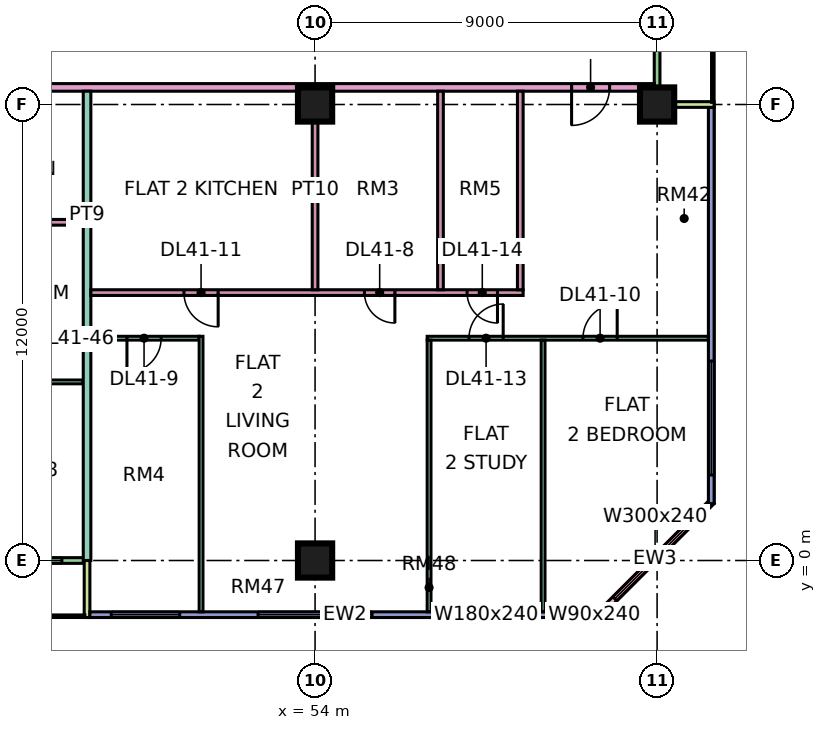
"""IFC4 building model, lengths in metres.
Left out: names, types, materials, properties, quantities, classifications, styles, units other than length and angle.
Written with IfcOpenShell. Run it as: python <this file> out.ifc"""

import sys

from ifc_helpers import new_model, si_unit, direction, frame, frame_2d, origin, origin_2d, place, context, subcontext, project, spatial, rectangle, extrude, element, fill, save


model = new_model("IFC4")
c1 = context("Model", 3, precision=1e-05, world=origin(), true_north=direction((0.0, 1.0)))
c2 = subcontext(c1, "Body", "Model", "MODEL_VIEW")
j1 = project(units=[si_unit("LENGTHUNIT", "METRE"), si_unit("PLANEANGLEUNIT", "RADIAN")], contexts=[c1])
p1 = place(None, origin())
s1 = spatial("IfcSite", under=j1, at=p1, CompositionType="ELEMENT")
p2 = place(p1, origin())
s2 = spatial("IfcBuilding", under=s1, at=p2, CompositionType="ELEMENT")
p3 = place(p2, frame((0.0, 0.0, 179.9)))
s3 = spatial("IfcBuildingStorey", under=s2, at=p3, CompositionType="ELEMENT", Elevation=179.9)
for number, where, z_axis, x_axis in (
    (1, (54.0, 0.0, 0.0), (0.0, 0.0, 1.0), (1.0, 0.0, 0.0)),
    (2, (54.0, 12.0, 0.0), (0.0, 0.0, 1.0), (1.0, 0.0, 0.0)),
    (3, (63.0, 12.0, 0.0), (0.0, 0.0, 1.0), (1.0, 0.0, 0.0)),
):
    element("IfcColumn", number, at=place(p3, frame(where, z_axis=z_axis, x_axis=x_axis)), inside=s3, PredefinedType="COLUMN", context=c2, shape_type="SweptSolid", body=[
        extrude(rectangle(XDim=0.9, YDim=0.9, at=origin_2d()), origin(), (0.0, 0.0, 1.0), 3.75),
    ])
p4 = place(p3, frame((36.075, 0.0, 0.0), z_axis=(0.0, 0.0, 1.0), x_axis=(1.0, 0.0, 0.0)))
e4 = element("IfcWall", 4, at=p4, inside=s3, PredefinedType="SOLIDWALL", context=c2, shape_type="SweptSolid", body=[
    extrude(rectangle(XDim=11.85, YDim=0.15, at=frame_2d((5.925, 0.0))), origin(), (0.0, 0.0, 1.0), 3.35),
])
p5 = place(p4, frame((2.3, 0.0, 0.0)))
e5 = element("IfcOpeningElement", 5, at=p5, cuts=e4, PredefinedType="OPENING", context=c2, shape_type="SweptSolid", body=[
    extrude(rectangle(XDim=1.8, YDim=2.4, at=frame_2d((0.9, 1.2))), frame((0.0, 0.085, 0.0), z_axis=(0.0, -1.0, 0.0), x_axis=(1.0, 0.0, 0.0)), (0.0, 0.0, 1.0), 0.17),
])
p6 = place(p4, frame((6.55, 0.0, 0.45)))
e6 = element("IfcOpeningElement", 6, at=p6, cuts=e4, PredefinedType="OPENING", context=c2, shape_type="SweptSolid", body=[
    extrude(rectangle(XDim=1.2, YDim=2.4, at=frame_2d((0.6, 1.2))), frame((0.0, 0.085, 0.0), z_axis=(0.0, -1.0, 0.0), x_axis=(1.0, 0.0, 0.0)), (0.0, 0.0, 1.0), 0.17),
])
p7 = place(p4, frame((10.062, 0.0, 0.45)))
e7 = element("IfcOpeningElement", 7, at=p7, cuts=e4, PredefinedType="OPENING", context=c2, shape_type="SweptSolid", body=[
    extrude(rectangle(XDim=1.2, YDim=2.4, at=frame_2d((0.6, 1.2))), frame((0.0, 0.085, 0.0), z_axis=(0.0, -1.0, 0.0), x_axis=(1.0, 0.0, 0.0)), (0.0, 0.0, 1.0), 0.17),
])
p8 = place(p3, frame((48.0, -1.5, 0.0), z_axis=(0.0, 0.0, 1.0), x_axis=(0.0, 1.0, 0.0)))
e8 = element("IfcWall", 8, at=p8, inside=s3, PredefinedType="SOLIDWALL", context=c2, shape_type="SweptSolid", body=[
    extrude(rectangle(XDim=1.5, YDim=0.15, at=frame_2d((0.75, 0.0))), origin(), (0.0, 0.0, 1.0), 3.35),
])
p9 = place(p3, frame((48.075, -1.425, 0.0), z_axis=(0.0, 0.0, 1.0), x_axis=(1.0, 0.0, 0.0)))
e9 = element("IfcWall", 9, at=p9, inside=s3, PredefinedType="SOLIDWALL", context=c2, shape_type="SweptSolid", body=[
    extrude(rectangle(XDim=13.425, YDim=0.15, at=frame_2d((6.712, 0.0))), origin(), (0.0, 0.0, 1.0), 3.35),
])
p10 = place(p9, frame((0.562, 0.0, 0.45)))
e10 = element("IfcOpeningElement", 10, at=p10, cuts=e9, PredefinedType="OPENING", context=c2, shape_type="SweptSolid", body=[
    extrude(rectangle(XDim=1.8, YDim=2.4, at=frame_2d((0.9, 1.2))), frame((0.0, 0.085, 0.0), z_axis=(0.0, -1.0, 0.0), x_axis=(1.0, 0.0, 0.0)), (0.0, 0.0, 1.0), 0.17),
])
p11 = place(p9, frame((4.425, 0.0, 0.45)))
e11 = element("IfcOpeningElement", 11, at=p11, cuts=e9, PredefinedType="OPENING", context=c2, shape_type="SweptSolid", body=[
    extrude(rectangle(XDim=3.0, YDim=2.4, at=frame_2d((1.5, 1.2))), frame((0.0, 0.085, 0.0), z_axis=(0.0, -1.0, 0.0), x_axis=(1.0, 0.0, 0.0)), (0.0, 0.0, 1.0), 0.17),
])
p12 = place(p9, frame((9.525, 0.0, 0.45)))
e12 = element("IfcOpeningElement", 12, at=p12, cuts=e9, PredefinedType="OPENING", context=c2, shape_type="SweptSolid", body=[
    extrude(rectangle(XDim=1.8, YDim=2.4, at=frame_2d((0.9, 1.2))), frame((0.0, 0.085, 0.0), z_axis=(0.0, -1.0, 0.0), x_axis=(1.0, 0.0, 0.0)), (0.0, 0.0, 1.0), 0.17),
])
p13 = place(p9, frame((12.225, 0.0, 0.45)))
e13 = element("IfcOpeningElement", 13, at=p13, cuts=e9, PredefinedType="OPENING", context=c2, shape_type="SweptSolid", body=[
    extrude(rectangle(XDim=0.9, YDim=2.4, at=frame_2d((0.45, 1.2))), frame((0.0, 0.085, 0.0), z_axis=(0.0, -1.0, 0.0), x_axis=(1.0, 0.0, 0.0)), (0.0, 0.0, 1.0), 0.17),
])
p14 = place(p3, frame((61.447, -1.447, 0.0), z_axis=(0.0, 0.0, 1.0), x_axis=(0.707106781187, 0.707106781187, 0.0)))
e14 = element("IfcWall", 14, at=p14, inside=s3, PredefinedType="SOLIDWALL", context=c2, shape_type="SweptSolid", body=[
    extrude(rectangle(XDim=4.243, YDim=0.15, at=frame_2d((2.121, 0.0))), origin(), (0.0, 0.0, 1.0), 3.35),
])
p15 = place(p14, frame((0.621, 0.0, 0.45)))
e15 = element("IfcOpeningElement", 15, at=p15, cuts=e14, PredefinedType="OPENING", context=c2, shape_type="SweptSolid", body=[
    extrude(rectangle(XDim=3.0, YDim=2.4, at=frame_2d((1.5, 1.2))), frame((0.0, 0.085, 0.0), z_axis=(0.0, -1.0, 0.0), x_axis=(1.0, 0.0, 0.0)), (0.0, 0.0, 1.0), 0.17),
])
p16 = place(p3, frame((64.425, 1.5, 0.0), z_axis=(0.0, 0.0, 1.0), x_axis=(0.0, 1.0, 0.0)))
e16 = element("IfcWall", 16, at=p16, inside=s3, PredefinedType="SOLIDWALL", context=c2, shape_type="SweptSolid", body=[
    extrude(rectangle(XDim=10.425, YDim=0.15, at=frame_2d((5.212, 0.0))), origin(), (0.0, 0.0, 1.0), 3.35),
])
p17 = place(p16, frame((0.75, 0.0, 0.45)))
e17 = element("IfcOpeningElement", 17, at=p17, cuts=e16, PredefinedType="OPENING", context=c2, shape_type="SweptSolid", body=[
    extrude(rectangle(XDim=3.0, YDim=2.4, at=frame_2d((1.5, 1.2))), frame((0.0, 0.085, 0.0), z_axis=(0.0, -1.0, 0.0), x_axis=(1.0, 0.0, 0.0)), (0.0, 0.0, 1.0), 0.17),
])
p18 = place(p3, frame((63.0, 12.075, 0.0), z_axis=(0.0, 0.0, 1.0), x_axis=(0.0, 1.0, 0.0)))
e18 = element("IfcWall", 18, at=p18, inside=s3, PredefinedType="SOLIDWALL", context=c2, shape_type="SweptSolid", body=[
    extrude(rectangle(XDim=10.35, YDim=0.15, at=frame_2d((5.175, 0.0))), origin(), (0.0, 0.0, 1.0), 3.35),
])
p19 = place(p18, frame((4.125, 0.0, 0.45)))
e19 = element("IfcOpeningElement", 19, at=p19, cuts=e18, PredefinedType="OPENING", context=c2, shape_type="SweptSolid", body=[
    extrude(rectangle(XDim=1.8, YDim=2.4, at=frame_2d((0.9, 1.2))), frame((0.0, 0.085, 0.0), z_axis=(0.0, -1.0, 0.0), x_axis=(1.0, 0.0, 0.0)), (0.0, 0.0, 1.0), 0.17),
])
p20 = place(p18, frame((7.538, 0.0, 0.0)))
e20 = element("IfcOpeningElement", 20, at=p20, cuts=e18, PredefinedType="OPENING", context=c2, shape_type="SweptSolid", body=[
    extrude(rectangle(XDim=1.8, YDim=2.4, at=frame_2d((0.9, 1.2))), frame((0.0, 0.085, 0.0), z_axis=(0.0, -1.0, 0.0), x_axis=(1.0, 0.0, 0.0)), (0.0, 0.0, 1.0), 0.17),
])
p21 = place(p3, frame((64.5, 12.0, 0.0), z_axis=(0.0, 0.0, 1.0), x_axis=(-1.0, 0.0, 0.0)))
e21 = element("IfcWall", 21, at=p21, inside=s3, PredefinedType="SOLIDWALL", context=c2, shape_type="SweptSolid", body=[
    extrude(rectangle(XDim=1.5, YDim=0.15, at=frame_2d((0.75, 0.0))), origin(), (0.0, 0.0, 1.0), 3.35),
])
p22 = place(p3, frame((33.05, 4.7, 0.0), z_axis=(0.0, 0.0, 1.0), x_axis=(1.0, 0.0, 0.0)))
e22 = element("IfcWall", 22, at=p22, inside=s3, PredefinedType="PARTITIONING", context=c2, shape_type="SweptSolid", body=[
    extrude(rectangle(XDim=14.85, YDim=0.1, at=frame_2d((7.425, 0.0))), origin(), (0.0, 0.0, 1.0), 3.35),
])
p23 = place(p22, frame((10.0, 0.0, 0.0)))
e23 = element("IfcOpeningElement", 23, at=p23, cuts=e22, PredefinedType="OPENING", context=c2, shape_type="SweptSolid", body=[
    extrude(rectangle(XDim=0.9, YDim=2.1, at=frame_2d((0.45, 1.05))), frame((0.0, 0.06, 0.0), z_axis=(0.0, -1.0, 0.0), x_axis=(1.0, 0.0, 0.0)), (0.0, 0.0, 1.0), 0.12),
])
p24 = place(p22, frame((13.0, 0.0, 0.0)))
e24 = element("IfcOpeningElement", 24, at=p24, cuts=e22, PredefinedType="OPENING", context=c2, shape_type="SweptSolid", body=[
    extrude(rectangle(XDim=0.9, YDim=2.1, at=frame_2d((0.45, 1.05))), frame((0.0, 0.06, 0.0), z_axis=(0.0, -1.0, 0.0), x_axis=(1.0, 0.0, 0.0)), (0.0, 0.0, 1.0), 0.12),
])
p25 = place(p22, frame((4.0, 0.0, 0.0)))
e25 = element("IfcOpeningElement", 25, at=p25, cuts=e22, PredefinedType="OPENING", context=c2, shape_type="SweptSolid", body=[
    extrude(rectangle(XDim=0.9, YDim=2.1, at=frame_2d((0.45, 1.05))), frame((0.0, 0.06, 0.0), z_axis=(0.0, -1.0, 0.0), x_axis=(1.0, 0.0, 0.0)), (0.0, 0.0, 1.0), 0.12),
])
p26 = place(p3, frame((40.65, 12.45, 0.0), z_axis=(0.0, 0.0, 1.0), x_axis=(1.0, 0.0, 0.0)))
e26 = element("IfcWall", 26, at=p26, inside=s3, PredefinedType="PARTITIONING", context=c2, shape_type="SweptSolid", body=[
    extrude(rectangle(XDim=22.276, YDim=0.2, at=frame_2d((11.138, 0.0))), origin(), (0.0, 0.0, 1.0), 3.35),
])
p27 = place(p26, frame((20.1, 0.0, 0.0)))
e27 = element("IfcOpeningElement", 27, at=p27, cuts=e26, PredefinedType="OPENING", context=c2, shape_type="SweptSolid", body=[
    extrude(rectangle(XDim=1.0, YDim=2.1, at=frame_2d((0.5, 1.05))), frame((0.0, 0.11, 0.0), z_axis=(0.0, -1.0, 0.0), x_axis=(1.0, 0.0, 0.0)), (0.0, 0.0, 1.0), 0.22),
])
p28 = place(p26, frame((1.05, 0.0, 0.0)))
e28 = element("IfcOpeningElement", 28, at=p28, cuts=e26, PredefinedType="OPENING", context=c2, shape_type="SweptSolid", body=[
    extrude(rectangle(XDim=1.0, YDim=2.1, at=frame_2d((0.5, 1.05))), frame((0.0, 0.11, 0.0), z_axis=(0.0, -1.0, 0.0), x_axis=(1.0, 0.0, 0.0)), (0.0, 0.0, 1.0), 0.22),
])
p29 = place(p3, frame((43.725, 5.9, 0.0), z_axis=(0.0, 0.0, 1.0), x_axis=(1.0, 0.0, 0.0)))
e29 = element("IfcWall", 29, at=p29, inside=s3, PredefinedType="PARTITIONING", context=c2, shape_type="SweptSolid", body=[
    extrude(rectangle(XDim=4.175, YDim=0.15, at=frame_2d((2.087, 0.0))), origin(), (0.0, 0.0, 1.0), 3.35),
])
p30 = place(p29, frame((1.675, 0.0, 0.0)))
e30 = element("IfcOpeningElement", 30, at=p30, cuts=e29, PredefinedType="OPENING", context=c2, shape_type="SweptSolid", body=[
    extrude(rectangle(XDim=0.8, YDim=2.1, at=frame_2d((0.4, 1.05))), frame((0.0, 0.085, 0.0), z_axis=(0.0, -1.0, 0.0), x_axis=(1.0, 0.0, 0.0)), (0.0, 0.0, 1.0), 0.17),
])
p31 = place(p3, frame((43.725, 8.9, 0.0), z_axis=(0.0, 0.0, 1.0), x_axis=(1.0, 0.0, 0.0)))
e31 = element("IfcWall", 31, at=p31, inside=s3, PredefinedType="PARTITIONING", context=c2, shape_type="SweptSolid", body=[
    extrude(rectangle(XDim=4.175, YDim=0.15, at=frame_2d((2.087, 0.0))), origin(), (0.0, 0.0, 1.0), 3.35),
])
p32 = place(p3, frame((48.0, 0.0, 0.0), z_axis=(0.0, 0.0, 1.0), x_axis=(0.0, 1.0, 0.0)))
e32 = element("IfcWall", 32, at=p32, inside=s3, PredefinedType="PARTITIONING", context=c2, shape_type="SweptSolid", body=[
    extrude(rectangle(XDim=5.9, YDim=0.2, at=frame_2d((2.95, 0.0))), origin(), (0.0, 0.0, 1.0), 3.35),
])
p33 = place(p3, frame((48.0, 5.825, 0.0), z_axis=(0.0, 0.0, 1.0), x_axis=(0.0, 1.0, 0.0)))
e33 = element("IfcWall", 33, at=p33, inside=s3, PredefinedType="PARTITIONING", context=c2, shape_type="SweptSolid", body=[
    extrude(rectangle(XDim=6.525, YDim=0.2, at=frame_2d((3.263, 0.0))), origin(), (0.0, 0.0, 1.0), 3.35),
])
p34 = place(p3, frame((48.1, 5.85, 0.0), z_axis=(0.0, 0.0, 1.0), x_axis=(1.0, 0.0, 0.0)))
e34 = element("IfcWall", 34, at=p34, inside=s3, PredefinedType="PARTITIONING", context=c2, shape_type="SweptSolid", body=[
    extrude(rectangle(XDim=2.85, YDim=0.1, at=frame_2d((1.425, 0.0))), origin(), (0.0, 0.0, 1.0), 3.35),
])
p35 = place(p34, frame((0.95, 0.0, 0.0)))
e35 = element("IfcOpeningElement", 35, at=p35, cuts=e34, PredefinedType="OPENING", context=c2, shape_type="SweptSolid", body=[
    extrude(rectangle(XDim=0.9, YDim=2.1, at=frame_2d((0.45, 1.05))), frame((0.0, 0.06, 0.0), z_axis=(0.0, -1.0, 0.0), x_axis=(1.0, 0.0, 0.0)), (0.0, 0.0, 1.0), 0.12),
])
p36 = place(p3, frame((48.1, 7.05, 0.0), z_axis=(0.0, 0.0, 1.0), x_axis=(1.0, 0.0, 0.0)))
e36 = element("IfcWall", 36, at=p36, inside=s3, PredefinedType="PARTITIONING", context=c2, shape_type="SweptSolid", body=[
    extrude(rectangle(XDim=11.375, YDim=0.15, at=frame_2d((5.688, 0.0))), origin(), (0.0, 0.0, 1.0), 3.35),
])
p37 = place(p36, frame((7.2, 0.0, 0.0)))
e37 = element("IfcOpeningElement", 37, at=p37, cuts=e36, PredefinedType="OPENING", context=c2, shape_type="SweptSolid", body=[
    extrude(rectangle(XDim=0.8, YDim=2.1, at=frame_2d((0.4, 1.05))), frame((0.0, 0.085, 0.0), z_axis=(0.0, -1.0, 0.0), x_axis=(1.0, 0.0, 0.0)), (0.0, 0.0, 1.0), 0.17),
])
p38 = place(p36, frame((2.45, 0.0, 0.0)))
e38 = element("IfcOpeningElement", 38, at=p38, cuts=e36, PredefinedType="OPENING", context=c2, shape_type="SweptSolid", body=[
    extrude(rectangle(XDim=0.9, YDim=2.1, at=frame_2d((0.45, 1.05))), frame((0.0, 0.085, 0.0), z_axis=(0.0, -1.0, 0.0), x_axis=(1.0, 0.0, 0.0)), (0.0, 0.0, 1.0), 0.17),
])
p39 = place(p36, frame((9.9, 0.0, 0.0)))
e39 = element("IfcOpeningElement", 39, at=p39, cuts=e36, PredefinedType="OPENING", context=c2, shape_type="SweptSolid", body=[
    extrude(rectangle(XDim=0.8, YDim=2.1, at=frame_2d((0.4, 1.05))), frame((0.0, 0.085, 0.0), z_axis=(0.0, -1.0, 0.0), x_axis=(1.0, 0.0, 0.0)), (0.0, 0.0, 1.0), 0.17),
])
p40 = place(p3, frame((51.0, -1.35, 0.0), z_axis=(0.0, 0.0, 1.0), x_axis=(0.0, 1.0, 0.0)))
e40 = element("IfcWall", 40, at=p40, inside=s3, PredefinedType="PARTITIONING", context=c2, shape_type="SweptSolid", body=[
    extrude(rectangle(XDim=7.25, YDim=0.1, at=frame_2d((3.625, 0.0))), origin(), (0.0, 0.0, 1.0), 3.35),
])
p41 = place(p3, frame((54.0, 7.125, 0.0), z_axis=(0.0, 0.0, 1.0), x_axis=(0.0, 1.0, 0.0)))
e41 = element("IfcWall", 41, at=p41, inside=s3, PredefinedType="PARTITIONING", context=c2, shape_type="SweptSolid", body=[
    extrude(rectangle(XDim=5.225, YDim=0.15, at=frame_2d((2.613, 0.0))), origin(), (0.0, 0.0, 1.0), 3.35),
])
p42 = place(p3, frame((56.95, 5.85, 0.0), z_axis=(0.0, 0.0, 1.0), x_axis=(1.0, 0.0, 0.0)))
e42 = element("IfcWall", 42, at=p42, inside=s3, PredefinedType="PARTITIONING", context=c2, shape_type="SweptSolid", body=[
    extrude(rectangle(XDim=7.4, YDim=0.1, at=frame_2d((3.7, 0.0))), origin(), (0.0, 0.0, 1.0), 3.35),
])
p43 = place(p42, frame((4.1, 0.0, 0.0)))
e43 = element("IfcOpeningElement", 43, at=p43, cuts=e42, PredefinedType="OPENING", context=c2, shape_type="SweptSolid", body=[
    extrude(rectangle(XDim=0.9, YDim=2.1, at=frame_2d((0.45, 1.05))), frame((0.0, 0.06, 0.0), z_axis=(0.0, -1.0, 0.0), x_axis=(1.0, 0.0, 0.0)), (0.0, 0.0, 1.0), 0.12),
])
p44 = place(p42, frame((1.1, 0.0, 0.0)))
e44 = element("IfcOpeningElement", 44, at=p44, cuts=e42, PredefinedType="OPENING", context=c2, shape_type="SweptSolid", body=[
    extrude(rectangle(XDim=0.9, YDim=2.1, at=frame_2d((0.45, 1.05))), frame((0.0, 0.06, 0.0), z_axis=(0.0, -1.0, 0.0), x_axis=(1.0, 0.0, 0.0)), (0.0, 0.0, 1.0), 0.12),
])
p45 = place(p3, frame((57.0, -1.35, 0.0), z_axis=(0.0, 0.0, 1.0), x_axis=(0.0, 1.0, 0.0)))
e45 = element("IfcWall", 45, at=p45, inside=s3, PredefinedType="PARTITIONING", context=c2, shape_type="SweptSolid", body=[
    extrude(rectangle(XDim=7.15, YDim=0.1, at=frame_2d((3.575, 0.0))), origin(), (0.0, 0.0, 1.0), 3.35),
])
for number, where, z_axis, x_axis in (
    (46, (57.3, 7.125, 0.0), (0.0, 0.0, 1.0), (0.0, 1.0, 0.0)),
    (47, (59.4, 7.125, 0.0), (0.0, 0.0, 1.0), (0.0, 1.0, 0.0)),
):
    element("IfcWall", number, at=place(p3, frame(where, z_axis=z_axis, x_axis=x_axis)), inside=s3, PredefinedType="PARTITIONING", context=c2, shape_type="SweptSolid", body=[
        extrude(rectangle(XDim=5.225, YDim=0.15, at=frame_2d((2.613, 0.0))), origin(), (0.0, 0.0, 1.0), 3.35),
    ])
p46 = place(p3, frame((60.0, -1.35, 0.0), z_axis=(0.0, 0.0, 1.0), x_axis=(0.0, 1.0, 0.0)))
e48 = element("IfcWall", 48, at=p46, inside=s3, PredefinedType="PARTITIONING", context=c2, shape_type="SweptSolid", body=[
    extrude(rectangle(XDim=7.15, YDim=0.1, at=frame_2d((3.575, 0.0))), origin(), (0.0, 0.0, 1.0), 3.35),
])
p47 = place(p7, origin())
e49 = element("IfcWindow", 49, at=p47, inside=s3, PartitioningType="SINGLE_PANEL", PredefinedType="WINDOW", context=c2, shape_type="SweptSolid", body=[
    extrude(rectangle(XDim=1.2, YDim=2.4, at=frame_2d((0.6, 1.2))), frame((0.0, 0.03, 0.0), z_axis=(0.0, -1.0, 0.0), x_axis=(1.0, 0.0, 0.0)), (0.0, 0.0, 1.0), 0.06),
])
fill(e7, e49)
p48 = place(p10, origin())
e50 = element("IfcWindow", 50, at=p48, inside=s3, PartitioningType="SINGLE_PANEL", PredefinedType="WINDOW", context=c2, shape_type="SweptSolid", body=[
    extrude(rectangle(XDim=1.8, YDim=2.4, at=frame_2d((0.9, 1.2))), frame((0.0, 0.03, 0.0), z_axis=(0.0, -1.0, 0.0), x_axis=(1.0, 0.0, 0.0)), (0.0, 0.0, 1.0), 0.06),
])
fill(e10, e50)
p49 = place(p11, origin())
e51 = element("IfcWindow", 51, at=p49, inside=s3, PartitioningType="SINGLE_PANEL", PredefinedType="WINDOW", context=c2, shape_type="SweptSolid", body=[
    extrude(rectangle(XDim=3.0, YDim=2.4, at=frame_2d((1.5, 1.2))), frame((0.0, 0.03, 0.0), z_axis=(0.0, -1.0, 0.0), x_axis=(1.0, 0.0, 0.0)), (0.0, 0.0, 1.0), 0.06),
])
fill(e11, e51)
p50 = place(p12, origin())
e52 = element("IfcWindow", 52, at=p50, inside=s3, PartitioningType="SINGLE_PANEL", PredefinedType="WINDOW", context=c2, shape_type="SweptSolid", body=[
    extrude(rectangle(XDim=1.8, YDim=2.4, at=frame_2d((0.9, 1.2))), frame((0.0, 0.03, 0.0), z_axis=(0.0, -1.0, 0.0), x_axis=(1.0, 0.0, 0.0)), (0.0, 0.0, 1.0), 0.06),
])
fill(e12, e52)
p51 = place(p13, origin())
e53 = element("IfcWindow", 53, at=p51, inside=s3, PartitioningType="SINGLE_PANEL", PredefinedType="WINDOW", context=c2, shape_type="SweptSolid", body=[
    extrude(rectangle(XDim=0.9, YDim=2.4, at=frame_2d((0.45, 1.2))), frame((0.0, 0.03, 0.0), z_axis=(0.0, -1.0, 0.0), x_axis=(1.0, 0.0, 0.0)), (0.0, 0.0, 1.0), 0.06),
])
fill(e13, e53)
p52 = place(p15, origin())
e54 = element("IfcWindow", 54, at=p52, inside=s3, PartitioningType="SINGLE_PANEL", PredefinedType="WINDOW", context=c2, shape_type="SweptSolid", body=[
    extrude(rectangle(XDim=3.0, YDim=2.4, at=frame_2d((1.5, 1.2))), frame((0.0, 0.03, 0.0), z_axis=(0.0, -1.0, 0.0), x_axis=(1.0, 0.0, 0.0)), (0.0, 0.0, 1.0), 0.06),
])
fill(e15, e54)
p53 = place(p17, origin())
e55 = element("IfcWindow", 55, at=p53, inside=s3, PartitioningType="SINGLE_PANEL", PredefinedType="WINDOW", context=c2, shape_type="SweptSolid", body=[
    extrude(rectangle(XDim=3.0, YDim=2.4, at=frame_2d((1.5, 1.2))), frame((0.0, 0.03, 0.0), z_axis=(0.0, -1.0, 0.0), x_axis=(1.0, 0.0, 0.0)), (0.0, 0.0, 1.0), 0.06),
])
fill(e17, e55)
p54 = place(p37, origin())
e56 = element("IfcDoor", 56, at=p54, inside=s3, OperationType="SINGLE_SWING_RIGHT", PredefinedType="DOOR", context=c2, shape_type="SweptSolid", body=[
    extrude(rectangle(XDim=0.8, YDim=2.1, at=frame_2d((0.4, 1.05))), frame((0.0, 0.025, 0.0), z_axis=(0.0, -1.0, 0.0), x_axis=(1.0, 0.0, 0.0)), (0.0, 0.0, 1.0), 0.05),
])
fill(e37, e56)
p55 = place(p35, frame((0.9, 0.0, 0.0), z_axis=(0.0, 0.0, 1.0), x_axis=(-1.0, 0.0, 0.0)))
e57 = element("IfcDoor", 57, at=p55, inside=s3, OperationType="SINGLE_SWING_LEFT", PredefinedType="DOOR", context=c2, shape_type="SweptSolid", body=[
    extrude(rectangle(XDim=0.9, YDim=2.1, at=frame_2d((0.45, 1.05))), frame((0.0, 0.025, 0.0), z_axis=(0.0, -1.0, 0.0), x_axis=(1.0, 0.0, 0.0)), (0.0, 0.0, 1.0), 0.05),
])
fill(e35, e57)
p56 = place(p43, frame((0.9, 0.0, 0.0), z_axis=(0.0, 0.0, 1.0), x_axis=(-1.0, 0.0, 0.0)))
e58 = element("IfcDoor", 58, at=p56, inside=s3, OperationType="SINGLE_SWING_RIGHT", PredefinedType="DOOR", context=c2, shape_type="SweptSolid", body=[
    extrude(rectangle(XDim=0.9, YDim=2.1, at=frame_2d((0.45, 1.05))), frame((0.0, 0.025, 0.0), z_axis=(0.0, -1.0, 0.0), x_axis=(1.0, 0.0, 0.0)), (0.0, 0.0, 1.0), 0.05),
])
fill(e43, e58)
p57 = place(p38, origin())
e59 = element("IfcDoor", 59, at=p57, inside=s3, OperationType="SINGLE_SWING_RIGHT", PredefinedType="DOOR", context=c2, shape_type="SweptSolid", body=[
    extrude(rectangle(XDim=0.9, YDim=2.1, at=frame_2d((0.45, 1.05))), frame((0.0, 0.025, 0.0), z_axis=(0.0, -1.0, 0.0), x_axis=(1.0, 0.0, 0.0)), (0.0, 0.0, 1.0), 0.05),
])
fill(e38, e59)
p58 = place(p27, frame((1.0, 0.0, 0.0), z_axis=(0.0, 0.0, 1.0), x_axis=(-1.0, 0.0, 0.0)))
e60 = element("IfcDoor", 60, at=p58, inside=s3, OperationType="SINGLE_SWING_LEFT", PredefinedType="DOOR", context=c2, shape_type="SweptSolid", body=[
    extrude(rectangle(XDim=1.0, YDim=2.1, at=frame_2d((0.5, 1.05))), frame((0.0, 0.025, 0.0), z_axis=(0.0, -1.0, 0.0), x_axis=(1.0, 0.0, 0.0)), (0.0, 0.0, 1.0), 0.05),
])
fill(e27, e60)
p59 = place(p44, frame((0.9, 0.0, 0.0), z_axis=(0.0, 0.0, 1.0), x_axis=(-1.0, 0.0, 0.0)))
e61 = element("IfcDoor", 61, at=p59, inside=s3, OperationType="SINGLE_SWING_RIGHT", PredefinedType="DOOR", context=c2, shape_type="SweptSolid", body=[
    extrude(rectangle(XDim=0.9, YDim=2.1, at=frame_2d((0.45, 1.05))), frame((0.0, 0.025, 0.0), z_axis=(0.0, -1.0, 0.0), x_axis=(1.0, 0.0, 0.0)), (0.0, 0.0, 1.0), 0.05),
])
fill(e44, e61)
p60 = place(p39, origin())
e62 = element("IfcDoor", 62, at=p60, inside=s3, OperationType="SINGLE_SWING_RIGHT", PredefinedType="DOOR", context=c2, shape_type="SweptSolid", body=[
    extrude(rectangle(XDim=0.8, YDim=2.1, at=frame_2d((0.4, 1.05))), frame((0.0, 0.025, 0.0), z_axis=(0.0, -1.0, 0.0), x_axis=(1.0, 0.0, 0.0)), (0.0, 0.0, 1.0), 0.05),
])
fill(e39, e62)
save(model, sys.argv[1])
